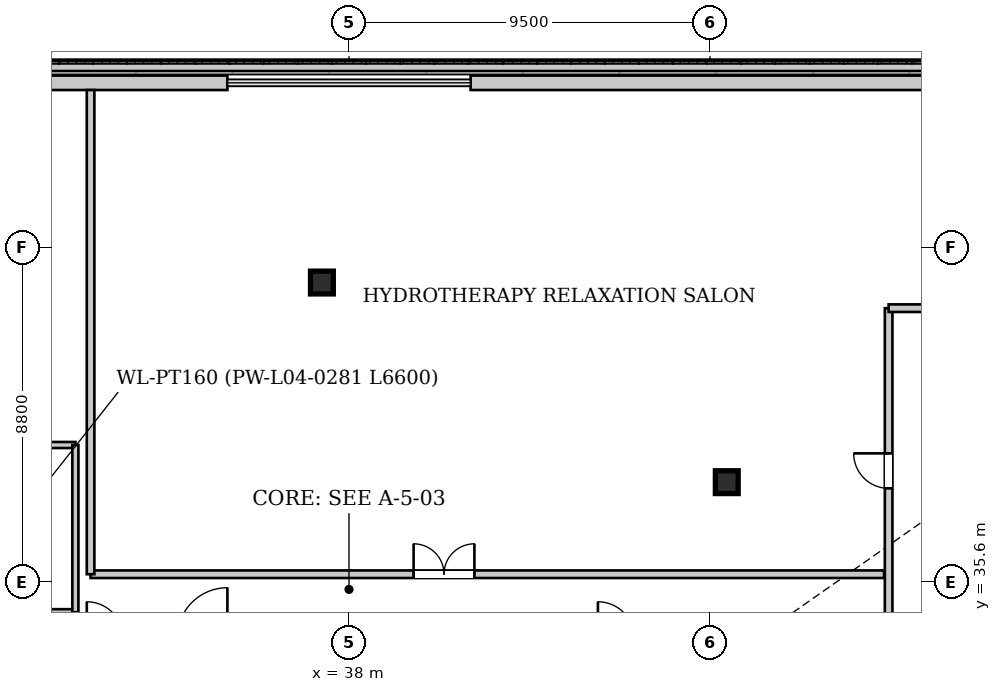
"""IFC4 building model, lengths in metres.
Left out: names, types, materials, properties, quantities, classifications, styles, units other than length and angle.
Written with IfcOpenShell. Run it as: python <this file> out.ifc"""

import sys

from ifc_helpers import new_model, si_unit, direction, frame, frame_2d, origin, origin_2d, place, context, subcontext, project, spatial, rectangle, hollow_rectangle, extrude, source, transform, mapped, element, fill, save


model = new_model("IFC4")
c1 = context("Model", 3, precision=1e-05, world=origin(), true_north=direction((0.0, 1.0)))
c2 = subcontext(c1, "Body", "Model", "MODEL_VIEW")
j1 = project(units=[si_unit("LENGTHUNIT", "METRE"), si_unit("PLANEANGLEUNIT", "RADIAN")], contexts=[c1])
p1 = place(None, origin())
s1 = spatial("IfcSite", under=j1, at=p1, CompositionType="ELEMENT")
p2 = place(p1, origin())
s2 = spatial("IfcBuilding", under=s1, at=p2, CompositionType="ELEMENT")
p3 = place(p2, frame((0.0, 0.0, 20.1)))
s3 = spatial("IfcBuildingStorey", under=s2, at=p3, CompositionType="ELEMENT", Elevation=20.1)
m1 = source(origin(), c2, "Body", "SweptSolid", [
    extrude(hollow_rectangle(XDim=0.6, YDim=0.6, WallThickness=0.035, at=origin_2d()), origin(), (0.0, 0.0, 1.0), 3.28),
])
for number, where, z_axis, x_axis in (
    (1, (47.941, 38.222, 0.0), (0.0, 0.0, 1.0), (1.0, 0.0, 0.0)),
    (2, (37.287, 43.475, 0.0), (0.0, 0.0, 1.0), (1.0, 0.0, 0.0)),
):
    element("IfcColumn", number, at=place(p3, frame(where, z_axis=z_axis, x_axis=x_axis)), inside=s3, PredefinedType="COLUMN", context=c2, shape_type="MappedRepresentation", body=[
        mapped(m1, transform((0.0, 0.0, 0.0), x_axis=(1.0, 0.0, 0.0), y_axis=(0.0, 1.0, 0.0), z_axis=(0.0, 0.0, 1.0), scale=1.0)),
    ])
p4 = place(p3, frame((6.2, 48.73, 0.0), z_axis=(0.0, 0.0, 1.0), x_axis=(1.0, 0.0, 0.0)))
e3 = element("IfcWall", 3, at=p4, inside=s3, PredefinedType="SOLIDWALL", context=c2, shape_type="SweptSolid", body=[
    extrude(rectangle(XDim=28.6, YDim=0.38, at=frame_2d((14.3, 0.0))), origin(), (0.0, 0.0, 1.0), 3.2),
])
p5 = place(p4, frame((13.4, 0.0, 0.68)))
e4 = element("IfcOpeningElement", 4, at=p5, cuts=e3, PredefinedType="OPENING", context=c2, shape_type="SweptSolid", body=[
    extrude(rectangle(XDim=1.8, YDim=2.4, at=frame_2d((0.9, 1.2))), frame((0.0, 0.2, 0.0), z_axis=(0.0, -1.0, 0.0), x_axis=(1.0, 0.0, 0.0)), (0.0, 0.0, 1.0), 0.4),
])
p6 = place(p3, frame((41.2, 48.73, 0.0), z_axis=(0.0, 0.0, 1.0), x_axis=(1.0, 0.0, 0.0)))
e5 = element("IfcWall", 5, at=p6, inside=s3, PredefinedType="SOLIDWALL", context=c2, shape_type="SweptSolid", body=[
    extrude(rectangle(XDim=28.6, YDim=0.38, at=frame_2d((14.3, 0.0))), origin(), (0.0, 0.0, 1.0), 3.2),
])
p7 = place(p6, frame((13.4, 0.0, 0.68)))
e6 = element("IfcOpeningElement", 6, at=p7, cuts=e5, PredefinedType="OPENING", context=c2, shape_type="SweptSolid", body=[
    extrude(rectangle(XDim=1.8, YDim=2.4, at=frame_2d((0.9, 1.2))), frame((0.0, 0.2, 0.0), z_axis=(0.0, -1.0, 0.0), x_axis=(1.0, 0.0, 0.0)), (0.0, 0.0, 1.0), 0.4),
])
p8 = place(p3, frame((5.35, 49.18, 0.0), z_axis=(0.0, 0.0, 1.0), x_axis=(1.0, 0.0, 0.0)))
e7 = element("IfcWall", 7, at=p8, inside=s3, PredefinedType="PARAPET", context=c2, shape_type="SweptSolid", body=[
    extrude(rectangle(XDim=65.3, YDim=0.28, at=frame_2d((32.65, 0.0))), origin(), (0.0, 0.0, 1.0), 0.45),
])
p9 = place(p3, frame((52.2, 4.66, 0.0), z_axis=(0.0, 0.0, 1.0), x_axis=(0.0, 1.0, 0.0)))
e8 = element("IfcWall", 8, at=p9, inside=s3, PredefinedType="PARTITIONING", context=c2, shape_type="SweptSolid", body=[
    extrude(rectangle(XDim=38.14, YDim=0.2, at=frame_2d((19.07, 0.0))), origin(), (0.0, 0.0, 1.0), 3.43),
])
p10 = place(p9, frame((6.2, 0.0, 0.0)))
e9 = element("IfcOpeningElement", 9, at=p10, cuts=e8, PredefinedType="OPENING", context=c2, shape_type="SweptSolid", body=[
    extrude(rectangle(XDim=1.6, YDim=2.2, at=frame_2d((0.8, 1.1))), frame((0.0, 0.11, 0.0), z_axis=(0.0, -1.0, 0.0), x_axis=(1.0, 0.0, 0.0)), (0.0, 0.0, 1.0), 0.22),
])
p11 = place(p9, frame((22.6, 0.0, 0.0)))
e10 = element("IfcOpeningElement", 10, at=p11, cuts=e8, PredefinedType="OPENING", context=c2, shape_type="SweptSolid", body=[
    extrude(rectangle(XDim=0.92, YDim=2.1, at=frame_2d((0.46, 1.05))), frame((0.0, 0.11, 0.0), z_axis=(0.0, -1.0, 0.0), x_axis=(1.0, 0.0, 0.0)), (0.0, 0.0, 1.0), 0.22),
])
p12 = place(p9, frame((33.4, 0.0, 0.0)))
e11 = element("IfcOpeningElement", 11, at=p12, cuts=e8, PredefinedType="OPENING", context=c2, shape_type="SweptSolid", body=[
    extrude(rectangle(XDim=0.92, YDim=2.1, at=frame_2d((0.46, 1.05))), frame((0.0, 0.11, 0.0), z_axis=(0.0, -1.0, 0.0), x_axis=(1.0, 0.0, 0.0)), (0.0, 0.0, 1.0), 0.22),
])
p13 = place(p3, frame((52.2, 42.8, 0.0), z_axis=(0.0, 0.0, 1.0), x_axis=(1.0, 0.0, 0.0)))
e12 = element("IfcWall", 12, at=p13, inside=s3, PredefinedType="PARTITIONING", context=c2, shape_type="SweptSolid", body=[
    extrude(rectangle(XDim=17.22, YDim=0.2, at=frame_2d((8.61, 0.0))), origin(), (0.0, 0.0, 1.0), 3.43),
])
p14 = place(p13, frame((10.1, 0.0, 0.0)))
e13 = element("IfcOpeningElement", 13, at=p14, cuts=e12, PredefinedType="OPENING", context=c2, shape_type="SweptSolid", body=[
    extrude(rectangle(XDim=1.6, YDim=2.2, at=frame_2d((0.8, 1.1))), frame((0.0, 0.11, 0.0), z_axis=(0.0, -1.0, 0.0), x_axis=(1.0, 0.0, 0.0)), (0.0, 0.0, 1.0), 0.22),
])
p15 = place(p3, frame((24.2, 34.8, 0.0), z_axis=(0.0, 0.0, 1.0), x_axis=(1.0, 0.0, 0.0)))
e14 = element("IfcWall", 14, at=p15, inside=s3, PredefinedType="PARTITIONING", context=c2, shape_type="SweptSolid", body=[
    extrude(rectangle(XDim=6.6, YDim=0.16, at=frame_2d((3.3, 0.0))), origin(), (0.0, 0.0, 1.0), 3.43),
])
p16 = place(p15, frame((1.0, 0.0, 0.0)))
e15 = element("IfcOpeningElement", 15, at=p16, cuts=e14, PredefinedType="OPENING", context=c2, shape_type="SweptSolid", body=[
    extrude(rectangle(XDim=0.9, YDim=2.1, at=frame_2d((0.45, 1.05))), frame((0.0, 0.09, 0.0), z_axis=(0.0, -1.0, 0.0), x_axis=(1.0, 0.0, 0.0)), (0.0, 0.0, 1.0), 0.18),
])
p17 = place(p15, frame((4.4, 0.0, 0.0)))
e16 = element("IfcOpeningElement", 16, at=p17, cuts=e14, PredefinedType="OPENING", context=c2, shape_type="SweptSolid", body=[
    extrude(rectangle(XDim=0.9, YDim=2.1, at=frame_2d((0.45, 1.05))), frame((0.0, 0.09, 0.0), z_axis=(0.0, -1.0, 0.0), x_axis=(1.0, 0.0, 0.0)), (0.0, 0.0, 1.0), 0.18),
])
p18 = place(p3, frame((24.2, 39.2, 0.0), z_axis=(0.0, 0.0, 1.0), x_axis=(1.0, 0.0, 0.0)))
e17 = element("IfcWall", 17, at=p18, inside=s3, PredefinedType="PARTITIONING", context=c2, shape_type="SweptSolid", body=[
    extrude(rectangle(XDim=6.6, YDim=0.16, at=frame_2d((3.3, 0.0))), origin(), (0.0, 0.0, 1.0), 3.43),
])
p19 = place(p3, frame((30.8, 34.8, 0.0), z_axis=(0.0, 0.0, 1.0), x_axis=(0.0, 1.0, 0.0)))
e18 = element("IfcWall", 18, at=p19, inside=s3, PredefinedType="PARTITIONING", context=c2, shape_type="SweptSolid", body=[
    extrude(rectangle(XDim=4.4, YDim=0.16, at=frame_2d((2.2, 0.0))), origin(), (0.0, 0.0, 1.0), 3.43),
])
p20 = place(p3, frame((31.2, 35.8, 0.0), z_axis=(0.0, 0.0, 1.0), x_axis=(1.0, 0.0, 0.0)))
e19 = element("IfcWall", 19, at=p20, inside=s3, PredefinedType="PARTITIONING", context=c2, shape_type="SweptSolid", body=[
    extrude(rectangle(XDim=20.88, YDim=0.2, at=frame_2d((10.44, 0.0))), origin(), (0.0, 0.0, 1.0), 3.43),
])
p21 = place(p20, frame((8.5, 0.0, 0.0)))
e20 = element("IfcOpeningElement", 20, at=p21, cuts=e19, PredefinedType="OPENING", context=c2, shape_type="SweptSolid", body=[
    extrude(rectangle(XDim=1.6, YDim=2.2, at=frame_2d((0.8, 1.1))), frame((0.0, 0.11, 0.0), z_axis=(0.0, -1.0, 0.0), x_axis=(1.0, 0.0, 0.0)), (0.0, 0.0, 1.0), 0.22),
])
p22 = place(p3, frame((31.2, 35.8, 0.0), z_axis=(0.0, 0.0, 1.0), x_axis=(0.0, 1.0, 0.0)))
e21 = element("IfcWall", 21, at=p22, inside=s3, PredefinedType="PARTITIONING", context=c2, shape_type="SweptSolid", body=[
    extrude(rectangle(XDim=12.74, YDim=0.2, at=frame_2d((6.37, 0.0))), origin(), (0.0, 0.0, 1.0), 3.43),
])
m2 = source(origin(), c2, "Body", "SweptSolid", [
    extrude(rectangle(XDim=0.92, YDim=2.1, at=frame_2d((0.46, 1.05))), frame((0.0, 0.025, 0.0), z_axis=(0.0, -1.0, 0.0), x_axis=(1.0, 0.0, 0.0)), (0.0, 0.0, 1.0), 0.05),
])
p23 = place(p12, origin())
e22 = element("IfcDoor", 22, at=p23, inside=s3, OperationType="SINGLE_SWING_RIGHT", PredefinedType="DOOR", context=c2, shape_type="MappedRepresentation", body=[
    mapped(m2, transform((0.0, 0.0, 0.0), x_axis=(1.0, 0.0, 0.0), y_axis=(0.0, 1.0, 0.0), z_axis=(0.0, 0.0, 1.0), scale=1.0)),
])
fill(e11, e22)
m3 = source(origin(), c2, "Body", "SweptSolid", [
    extrude(rectangle(XDim=1.6, YDim=2.2, at=frame_2d((0.8, 1.1))), frame((0.0, 0.025, 0.0), z_axis=(0.0, -1.0, 0.0), x_axis=(1.0, 0.0, 0.0)), (0.0, 0.0, 1.0), 0.05),
])
p24 = place(p21, origin())
e23 = element("IfcDoor", 23, at=p24, inside=s3, OperationType="DOUBLE_DOOR_SINGLE_SWING", PredefinedType="DOOR", context=c2, shape_type="MappedRepresentation", body=[
    mapped(m3, transform((0.0, 0.0, 0.0), x_axis=(1.0, 0.0, 0.0), y_axis=(0.0, 1.0, 0.0), z_axis=(0.0, 0.0, 1.0), scale=1.0)),
])
fill(e20, e23)
save(model, sys.argv[1])
